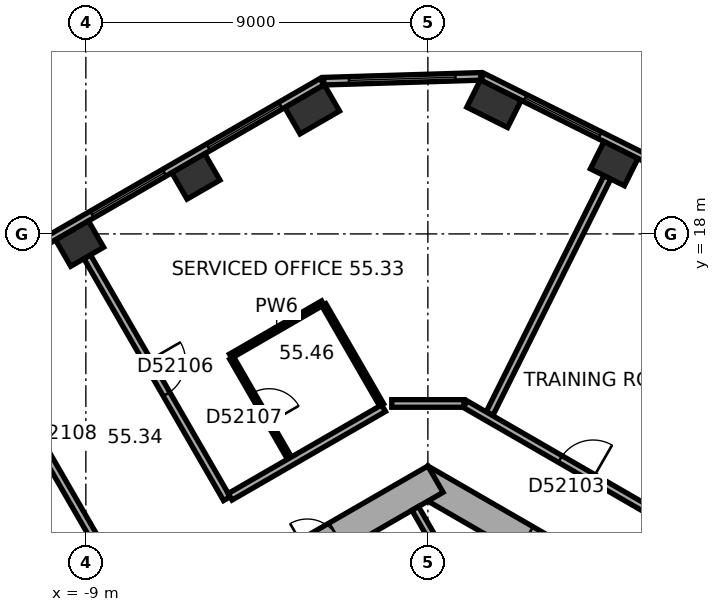
"""IFC4 building model, lengths in metres.
Left out: names, types, materials, properties, quantities, classifications, styles, units other than length and angle.
Written with IfcOpenShell. Run it as: python <this file> out.ifc"""

import sys

from ifc_helpers import new_model, si_unit, direction, frame, frame_2d, origin, origin_2d, place, context, subcontext, project, spatial, rectangle, extrude, element, fill, save


model = new_model("IFC4")
c1 = context("Model", 3, precision=1e-05, world=origin(), true_north=direction((0.0, 1.0)))
c2 = subcontext(c1, "Body", "Model", "MODEL_VIEW")
j1 = project(units=[si_unit("LENGTHUNIT", "METRE"), si_unit("PLANEANGLEUNIT", "RADIAN")], contexts=[c1])
p1 = place(None, origin())
s1 = spatial("IfcSite", under=j1, at=p1, CompositionType="ELEMENT")
p2 = place(p1, origin())
s2 = spatial("IfcBuilding", under=s1, at=p2, CompositionType="ELEMENT")
p3 = place(p2, frame((0.0, 0.0, 225.4)))
s3 = spatial("IfcBuildingStorey", under=s2, at=p3, CompositionType="ELEMENT", Elevation=225.4)
p4 = place(p3, frame((4.902, 19.848, 0.0), z_axis=(0.0, 0.0, 1.0), x_axis=(-0.894934361602, 0.44619781311, 0.0)))
e1 = element("IfcColumn", 1, at=p4, inside=s3, PredefinedType="COLUMN", context=c2, shape_type="SweptSolid", body=[
    extrude(rectangle(XDim=1.0, YDim=0.8, at=origin_2d()), origin(), (0.0, 0.0, 1.0), 3.7),
])
for number, where, z_axis, x_axis in (
    (2, (1.74, 21.425, 0.0), (0.0, 0.0, 1.0), (-0.895, 0.446, 0.0)),
    (3, (-3.044, 21.279, 0.0), (0.0, 0.0, 1.0), (-0.866, -0.5, 0.0)),
):
    element("IfcColumn", number, at=place(p3, frame(where, z_axis=z_axis, x_axis=x_axis)), inside=s3, PredefinedType="COLUMN", context=c2, shape_type="SweptSolid", body=[
        extrude(rectangle(XDim=1.2, YDim=0.8, at=origin_2d()), origin(), (0.0, 0.0, 1.0), 3.7),
    ])
for number, where, z_axis, x_axis in (
    (4, (-6.104, 19.512, 0.0), (0.0, 0.0, 1.0), (-0.866, -0.5, 0.0)),
    (5, (-9.165, 17.745, 0.0), (0.0, 0.0, 1.0), (-0.866, -0.5, 0.0)),
):
    element("IfcColumn", number, at=place(p3, frame(where, z_axis=z_axis, x_axis=x_axis)), inside=s3, PredefinedType="COLUMN", context=c2, shape_type="SweptSolid", body=[
        extrude(rectangle(XDim=1.0, YDim=0.8, at=origin_2d()), origin(), (0.0, 0.0, 1.0), 3.7),
    ])
p5 = place(p3, frame((10.1, 5.6, 0.0), z_axis=(0.0, 0.0, 1.0), x_axis=(-0.866023897231, 0.500002609418, 0.0)))
e6 = element("IfcWall", 6, at=p5, inside=s3, PredefinedType="SHEAR", context=c2, shape_type="SweptSolid", body=[
    extrude(rectangle(XDim=11.894, YDim=0.8, at=frame_2d((5.947, 0.0))), origin(), (0.0, 0.0, 1.0), 3.7),
])
p6 = place(p5, frame((3.897, 0.0, 0.0)))
e7 = element("IfcOpeningElement", 7, at=p6, cuts=e6, PredefinedType="OPENING", context=c2, shape_type="SweptSolid", body=[
    extrude(rectangle(XDim=0.9, YDim=2.1, at=frame_2d((0.45, 1.05))), frame((0.0, 0.41, 0.0), z_axis=(0.0, -1.0, 0.0), x_axis=(1.0, 0.0, 0.0)), (0.0, 0.0, 1.0), 0.82),
])
p7 = place(p5, frame((7.797, 0.0, 0.0)))
e8 = element("IfcOpeningElement", 8, at=p7, cuts=e6, PredefinedType="OPENING", context=c2, shape_type="SweptSolid", body=[
    extrude(rectangle(XDim=0.9, YDim=2.1, at=frame_2d((0.45, 1.05))), frame((0.0, 0.41, 0.0), z_axis=(0.0, -1.0, 0.0), x_axis=(1.0, 0.0, 0.0)), (0.0, 0.0, 1.0), 0.82),
])
p8 = place(p3, frame((0.2, 11.547, 0.0), z_axis=(0.0, 0.0, 1.0), x_axis=(-0.866023897231, -0.500002609418, 0.0)))
e9 = element("IfcWall", 9, at=p8, inside=s3, PredefinedType="SHEAR", context=c2, shape_type="SweptSolid", body=[
    extrude(rectangle(XDim=11.894, YDim=0.8, at=frame_2d((5.947, 0.0))), origin(), (0.0, 0.0, 1.0), 3.7),
])
p9 = place(p8, frame((6.147, 0.0, 0.0)))
e10 = element("IfcOpeningElement", 10, at=p9, cuts=e9, PredefinedType="OPENING", context=c2, shape_type="SweptSolid", body=[
    extrude(rectangle(XDim=1.5, YDim=2.1, at=frame_2d((0.75, 1.05))), frame((0.0, 0.41, 0.0), z_axis=(0.0, -1.0, 0.0), x_axis=(1.0, 0.0, 0.0)), (0.0, 0.0, 1.0), 0.82),
])
p10 = place(p8, frame((2.997, 0.0, 0.0)))
e11 = element("IfcOpeningElement", 11, at=p10, cuts=e9, PredefinedType="OPENING", context=c2, shape_type="SweptSolid", body=[
    extrude(rectangle(XDim=0.9, YDim=2.1, at=frame_2d((0.45, 1.05))), frame((0.0, 0.41, 0.0), z_axis=(0.0, -1.0, 0.0), x_axis=(1.0, 0.0, 0.0)), (0.0, 0.0, 1.0), 0.82),
])
p11 = place(p3, frame((18.299, 13.727, 0.0), z_axis=(0.0, 0.0, 1.0), x_axis=(-0.894934554817, 0.44619742558, 0.0)))
e12 = element("IfcWall", 12, at=p11, inside=s3, PredefinedType="STANDARD", context=c2, shape_type="SweptSolid", body=[
    extrude(rectangle(XDim=18.841, YDim=0.2, at=frame_2d((9.421, 0.0))), origin(), (0.0, 0.0, 1.0), 3.7),
])
p12 = place(p11, frame((1.253, 0.0, 0.9)))
e13 = element("IfcOpeningElement", 13, at=p12, cuts=e12, PredefinedType="OPENING", context=c2, shape_type="SweptSolid", body=[
    extrude(rectangle(XDim=2.2, YDim=2.0, at=frame_2d((1.1, 1.0))), frame((0.0, 0.11, 0.0), z_axis=(0.0, -1.0, 0.0), x_axis=(1.0, 0.0, 0.0)), (0.0, 0.0, 1.0), 0.22),
])
p13 = place(p11, frame((4.786, 0.0, 0.9)))
e14 = element("IfcOpeningElement", 14, at=p13, cuts=e12, PredefinedType="OPENING", context=c2, shape_type="SweptSolid", body=[
    extrude(rectangle(XDim=2.2, YDim=2.0, at=frame_2d((1.1, 1.0))), frame((0.0, 0.11, 0.0), z_axis=(0.0, -1.0, 0.0), x_axis=(1.0, 0.0, 0.0)), (0.0, 0.0, 1.0), 0.22),
])
p14 = place(p11, frame((8.32, 0.0, 0.9)))
e15 = element("IfcOpeningElement", 15, at=p14, cuts=e12, PredefinedType="OPENING", context=c2, shape_type="SweptSolid", body=[
    extrude(rectangle(XDim=2.2, YDim=2.0, at=frame_2d((1.1, 1.0))), frame((0.0, 0.11, 0.0), z_axis=(0.0, -1.0, 0.0), x_axis=(1.0, 0.0, 0.0)), (0.0, 0.0, 1.0), 0.22),
])
p15 = place(p11, frame((11.854, 0.0, 0.9)))
e16 = element("IfcOpeningElement", 16, at=p15, cuts=e12, PredefinedType="OPENING", context=c2, shape_type="SweptSolid", body=[
    extrude(rectangle(XDim=2.2, YDim=2.0, at=frame_2d((1.1, 1.0))), frame((0.0, 0.11, 0.0), z_axis=(0.0, -1.0, 0.0), x_axis=(1.0, 0.0, 0.0)), (0.0, 0.0, 1.0), 0.22),
])
p16 = place(p11, frame((15.387, 0.0, 0.9)))
e17 = element("IfcOpeningElement", 17, at=p16, cuts=e12, PredefinedType="OPENING", context=c2, shape_type="SweptSolid", body=[
    extrude(rectangle(XDim=2.2, YDim=2.0, at=frame_2d((1.1, 1.0))), frame((0.0, 0.11, 0.0), z_axis=(0.0, -1.0, 0.0), x_axis=(1.0, 0.0, 0.0)), (0.0, 0.0, 1.0), 0.22),
])
p17 = place(p3, frame((1.389, 22.145, 0.0), z_axis=(0.0, 0.0, 1.0), x_axis=(-0.999534702881, -0.030502093955, 0.0)))
e18 = element("IfcWall", 18, at=p17, inside=s3, PredefinedType="STANDARD", context=c2, shape_type="SweptSolid", body=[
    extrude(rectangle(XDim=4.13, YDim=0.2, at=frame_2d((2.065, 0.0))), origin(), (0.0, 0.0, 1.0), 3.7),
])
p18 = place(p17, frame((0.665, 0.0, 0.9)))
e19 = element("IfcOpeningElement", 19, at=p18, cuts=e18, PredefinedType="OPENING", context=c2, shape_type="SweptSolid", body=[
    extrude(rectangle(XDim=2.8, YDim=2.0, at=frame_2d((1.4, 1.0))), frame((0.0, 0.11, 0.0), z_axis=(0.0, -1.0, 0.0), x_axis=(1.0, 0.0, 0.0)), (0.0, 0.0, 1.0), 0.22),
])
p19 = place(p3, frame((-2.786, 22.005, 0.0), z_axis=(0.0, 0.0, 1.0), x_axis=(-0.866026555358, -0.49999800541, 0.0)))
e20 = element("IfcWall", 20, at=p19, inside=s3, PredefinedType="STANDARD", context=c2, shape_type="SweptSolid", body=[
    extrude(rectangle(XDim=18.841, YDim=0.2, at=frame_2d((9.421, 0.0))), origin(), (0.0, 0.0, 1.0), 3.7),
])
p20 = place(p19, frame((1.254, 0.0, 0.9)))
e21 = element("IfcOpeningElement", 21, at=p20, cuts=e20, PredefinedType="OPENING", context=c2, shape_type="SweptSolid", body=[
    extrude(rectangle(XDim=2.2, YDim=2.0, at=frame_2d((1.1, 1.0))), frame((0.0, 0.11, 0.0), z_axis=(0.0, -1.0, 0.0), x_axis=(1.0, 0.0, 0.0)), (0.0, 0.0, 1.0), 0.22),
])
p21 = place(p19, frame((4.788, 0.0, 0.9)))
e22 = element("IfcOpeningElement", 22, at=p21, cuts=e20, PredefinedType="OPENING", context=c2, shape_type="SweptSolid", body=[
    extrude(rectangle(XDim=2.2, YDim=2.0, at=frame_2d((1.1, 1.0))), frame((0.0, 0.11, 0.0), z_axis=(0.0, -1.0, 0.0), x_axis=(1.0, 0.0, 0.0)), (0.0, 0.0, 1.0), 0.22),
])
p22 = place(p19, frame((8.321, 0.0, 0.9)))
e23 = element("IfcOpeningElement", 23, at=p22, cuts=e20, PredefinedType="OPENING", context=c2, shape_type="SweptSolid", body=[
    extrude(rectangle(XDim=2.2, YDim=2.0, at=frame_2d((1.1, 1.0))), frame((0.0, 0.11, 0.0), z_axis=(0.0, -1.0, 0.0), x_axis=(1.0, 0.0, 0.0)), (0.0, 0.0, 1.0), 0.22),
])
p23 = place(p19, frame((11.855, 0.0, 0.9)))
e24 = element("IfcOpeningElement", 24, at=p23, cuts=e20, PredefinedType="OPENING", context=c2, shape_type="SweptSolid", body=[
    extrude(rectangle(XDim=2.2, YDim=2.0, at=frame_2d((1.1, 1.0))), frame((0.0, 0.11, 0.0), z_axis=(0.0, -1.0, 0.0), x_axis=(1.0, 0.0, 0.0)), (0.0, 0.0, 1.0), 0.22),
])
p24 = place(p19, frame((15.389, 0.0, 0.9)))
e25 = element("IfcOpeningElement", 25, at=p24, cuts=e20, PredefinedType="OPENING", context=c2, shape_type="SweptSolid", body=[
    extrude(rectangle(XDim=2.2, YDim=2.0, at=frame_2d((1.1, 1.0))), frame((0.0, 0.11, 0.0), z_axis=(0.0, -1.0, 0.0), x_axis=(1.0, 0.0, 0.0)), (0.0, 0.0, 1.0), 0.22),
])
p25 = place(p3, frame((0.767, 8.872, 0.0), z_axis=(0.0, 0.0, 1.0), x_axis=(-0.499994660107, 0.866028486751, 0.0)))
e26 = element("IfcWall", 26, at=p25, inside=s3, PredefinedType="PARTITIONING", context=c2, shape_type="SweptSolid", body=[
    extrude(rectangle(XDim=2.2, YDim=0.2, at=frame_2d((1.1, 0.0))), origin(), (0.0, 0.0, 1.0), 3.42),
])
p26 = place(p3, frame((-12.025, 15.632, 0.0), z_axis=(0.0, 0.0, 1.0), x_axis=(0.499983153418, -0.866035129944, 0.0)))
e27 = element("IfcWall", 27, at=p26, inside=s3, PredefinedType="PARTITIONING", context=c2, shape_type="SweptSolid", body=[
    extrude(rectangle(XDim=7.35, YDim=0.2, at=frame_2d((3.675, 0.0))), origin(), (0.0, 0.0, 1.0), 3.42),
])
p27 = place(p26, frame((3.175, 0.0, 0.0)))
e28 = element("IfcOpeningElement", 28, at=p27, cuts=e27, PredefinedType="OPENING", context=c2, shape_type="SweptSolid", body=[
    extrude(rectangle(XDim=1.0, YDim=2.1, at=frame_2d((0.5, 1.05))), frame((0.0, 0.11, 0.0), z_axis=(0.0, -1.0, 0.0), x_axis=(1.0, 0.0, 0.0)), (0.0, 0.0, 1.0), 0.22),
])
p28 = place(p3, frame((-8.965, 17.399, 0.0), z_axis=(0.0, 0.0, 1.0), x_axis=(0.499993683172, -0.866029050776, 0.0)))
e29 = element("IfcWall", 29, at=p28, inside=s3, PredefinedType="PARTITIONING", context=c2, shape_type="SweptSolid", body=[
    extrude(rectangle(XDim=7.35, YDim=0.2, at=frame_2d((3.675, 0.0))), origin(), (0.0, 0.0, 1.0), 2.87),
])
p29 = place(p28, frame((3.175, 0.0, 0.0)))
e30 = element("IfcOpeningElement", 30, at=p29, cuts=e29, PredefinedType="OPENING", context=c2, shape_type="SweptSolid", body=[
    extrude(rectangle(XDim=1.0, YDim=2.1, at=frame_2d((0.5, 1.05))), frame((0.0, 0.11, 0.0), z_axis=(0.0, -1.0, 0.0), x_axis=(1.0, 0.0, 0.0)), (0.0, 0.0, 1.0), 0.22),
])
p30 = place(p3, frame((-5.191, 14.785, 0.0), z_axis=(0.0, 0.0, 1.0), x_axis=(0.866034573852, 0.49998411664, 0.0)))
e31 = element("IfcWall", 31, at=p30, inside=s3, PredefinedType="PARTITIONING", context=c2, shape_type="SweptSolid", body=[
    extrude(rectangle(XDim=2.8, YDim=0.12, at=frame_2d((1.4, 0.0))), origin(), (0.0, 0.0, 1.0), 3.42),
])
p31 = place(p3, frame((-3.641, 12.101, 0.0), z_axis=(0.0, 0.0, 1.0), x_axis=(-0.500026023896, 0.86601037836, 0.0)))
e32 = element("IfcWall", 32, at=p31, inside=s3, PredefinedType="PARTITIONING", context=c2, shape_type="SweptSolid", body=[
    extrude(rectangle(XDim=3.04, YDim=0.12, at=frame_2d((1.52, 0.0))), origin(), (0.0, 0.0, 1.0), 3.42),
])
p32 = place(p31, frame((1.07, 0.0, 0.0)))
e33 = element("IfcOpeningElement", 33, at=p32, cuts=e32, PredefinedType="OPENING", context=c2, shape_type="SweptSolid", body=[
    extrude(rectangle(XDim=0.9, YDim=2.1, at=frame_2d((0.45, 1.05))), frame((0.0, 0.07, 0.0), z_axis=(0.0, -1.0, 0.0), x_axis=(1.0, 0.0, 0.0)), (0.0, 0.0, 1.0), 0.14),
])
p33 = place(p3, frame((-2.737, 16.133, 0.0), z_axis=(0.0, 0.0, 1.0), x_axis=(0.500026023896, -0.86601037836, 0.0)))
e34 = element("IfcWall", 34, at=p33, inside=s3, PredefinedType="PARTITIONING", context=c2, shape_type="SweptSolid", body=[
    extrude(rectangle(XDim=3.04, YDim=0.12, at=frame_2d((1.52, 0.0))), origin(), (0.0, 0.0, 1.0), 3.42),
])
p34 = place(p3, frame((-1.167, 13.414, 0.0), z_axis=(0.0, 0.0, 1.0), x_axis=(-0.866023347809, -0.500003561037, 0.0)))
e35 = element("IfcWall", 35, at=p34, inside=s3, PredefinedType="PARTITIONING", context=c2, shape_type="SweptSolid", body=[
    extrude(rectangle(XDim=4.661, YDim=0.2, at=frame_2d((2.331, 0.0))), origin(), (0.0, 0.0, 1.0), 3.42),
])
p35 = place(p3, frame((0.95, 13.539, 0.0), z_axis=(0.0, 0.0, 1.0), x_axis=(-1.0, 0.0, 0.0)))
e36 = element("IfcWall", 36, at=p35, inside=s3, PredefinedType="PARTITIONING", context=c2, shape_type="SweptSolid", body=[
    extrude(rectangle(XDim=1.9, YDim=0.2, at=frame_2d((0.95, 0.0))), origin(), (0.0, 0.0, 1.0), 3.42),
])
p36 = place(p3, frame((4.723, 19.49, 0.0), z_axis=(0.0, 0.0, 1.0), x_axis=(-0.446186614574, -0.894939944898, 0.0)))
e37 = element("IfcWall", 37, at=p36, inside=s3, PredefinedType="PARTITIONING", context=c2, shape_type="SweptSolid", body=[
    extrude(rectangle(XDim=6.944, YDim=0.2, at=frame_2d((3.472, 0.0))), origin(), (0.0, 0.0, 1.0), 2.87),
])
p37 = place(p3, frame((8.721, 9.052, 0.0), z_axis=(0.0, 0.0, 1.0), x_axis=(-0.866028125821, 0.499995285264, 0.0)))
e38 = element("IfcWall", 38, at=p37, inside=s3, PredefinedType="PARTITIONING", context=c2, shape_type="SweptSolid", body=[
    extrude(rectangle(XDim=8.934, YDim=0.2, at=frame_2d((4.467, 0.0))), origin(), (0.0, 0.0, 1.0), 3.42),
])
p38 = place(p37, frame((5.05, 0.0, 0.0)))
e39 = element("IfcOpeningElement", 39, at=p38, cuts=e38, PredefinedType="OPENING", context=c2, shape_type="SweptSolid", body=[
    extrude(rectangle(XDim=1.0, YDim=2.1, at=frame_2d((0.5, 1.05))), frame((0.0, 0.11, 0.0), z_axis=(0.0, -1.0, 0.0), x_axis=(1.0, 0.0, 0.0)), (0.0, 0.0, 1.0), 0.22),
])
p39 = place(p16, origin())
e40 = element("IfcWindow", 40, at=p39, inside=s3, PartitioningType="SINGLE_PANEL", PredefinedType="WINDOW", context=c2, shape_type="SweptSolid", body=[
    extrude(rectangle(XDim=2.2, YDim=2.0, at=frame_2d((1.1, 1.0))), frame((0.0, 0.03, 0.0), z_axis=(0.0, -1.0, 0.0), x_axis=(1.0, 0.0, 0.0)), (0.0, 0.0, 1.0), 0.06),
])
fill(e17, e40)
p40 = place(p18, origin())
e41 = element("IfcWindow", 41, at=p40, inside=s3, PartitioningType="SINGLE_PANEL", PredefinedType="WINDOW", context=c2, shape_type="SweptSolid", body=[
    extrude(rectangle(XDim=2.8, YDim=2.0, at=frame_2d((1.4, 1.0))), frame((0.0, 0.03, 0.0), z_axis=(0.0, -1.0, 0.0), x_axis=(1.0, 0.0, 0.0)), (0.0, 0.0, 1.0), 0.06),
])
fill(e19, e41)
p41 = place(p20, origin())
e42 = element("IfcWindow", 42, at=p41, inside=s3, PartitioningType="SINGLE_PANEL", PredefinedType="WINDOW", context=c2, shape_type="SweptSolid", body=[
    extrude(rectangle(XDim=2.2, YDim=2.0, at=frame_2d((1.1, 1.0))), frame((0.0, 0.03, 0.0), z_axis=(0.0, -1.0, 0.0), x_axis=(1.0, 0.0, 0.0)), (0.0, 0.0, 1.0), 0.06),
])
fill(e21, e42)
p42 = place(p21, origin())
e43 = element("IfcWindow", 43, at=p42, inside=s3, PartitioningType="SINGLE_PANEL", PredefinedType="WINDOW", context=c2, shape_type="SweptSolid", body=[
    extrude(rectangle(XDim=2.2, YDim=2.0, at=frame_2d((1.1, 1.0))), frame((0.0, 0.03, 0.0), z_axis=(0.0, -1.0, 0.0), x_axis=(1.0, 0.0, 0.0)), (0.0, 0.0, 1.0), 0.06),
])
fill(e22, e43)
p43 = place(p38, origin())
e44 = element("IfcDoor", 44, at=p43, inside=s3, OperationType="SINGLE_SWING_LEFT", PredefinedType="DOOR", context=c2, shape_type="SweptSolid", body=[
    extrude(rectangle(XDim=1.0, YDim=2.1, at=frame_2d((0.5, 1.05))), frame((0.0, 0.025, 0.0), z_axis=(0.0, -1.0, 0.0), x_axis=(1.0, 0.0, 0.0)), (0.0, 0.0, 1.0), 0.05),
])
fill(e39, e44)
p44 = place(p29, origin())
e45 = element("IfcDoor", 45, at=p44, inside=s3, OperationType="SINGLE_SWING_LEFT", PredefinedType="DOOR", context=c2, shape_type="SweptSolid", body=[
    extrude(rectangle(XDim=1.0, YDim=2.1, at=frame_2d((0.5, 1.05))), frame((0.0, 0.025, 0.0), z_axis=(0.0, -1.0, 0.0), x_axis=(1.0, 0.0, 0.0)), (0.0, 0.0, 1.0), 0.05),
])
fill(e30, e45)
p45 = place(p32, origin())
e46 = element("IfcDoor", 46, at=p45, inside=s3, OperationType="SINGLE_SWING_LEFT", PredefinedType="DOOR", context=c2, shape_type="SweptSolid", body=[
    extrude(rectangle(XDim=0.9, YDim=2.1, at=frame_2d((0.45, 1.05))), frame((0.0, 0.025, 0.0), z_axis=(0.0, -1.0, 0.0), x_axis=(1.0, 0.0, 0.0)), (0.0, 0.0, 1.0), 0.05),
])
fill(e33, e46)
save(model, sys.argv[1])
